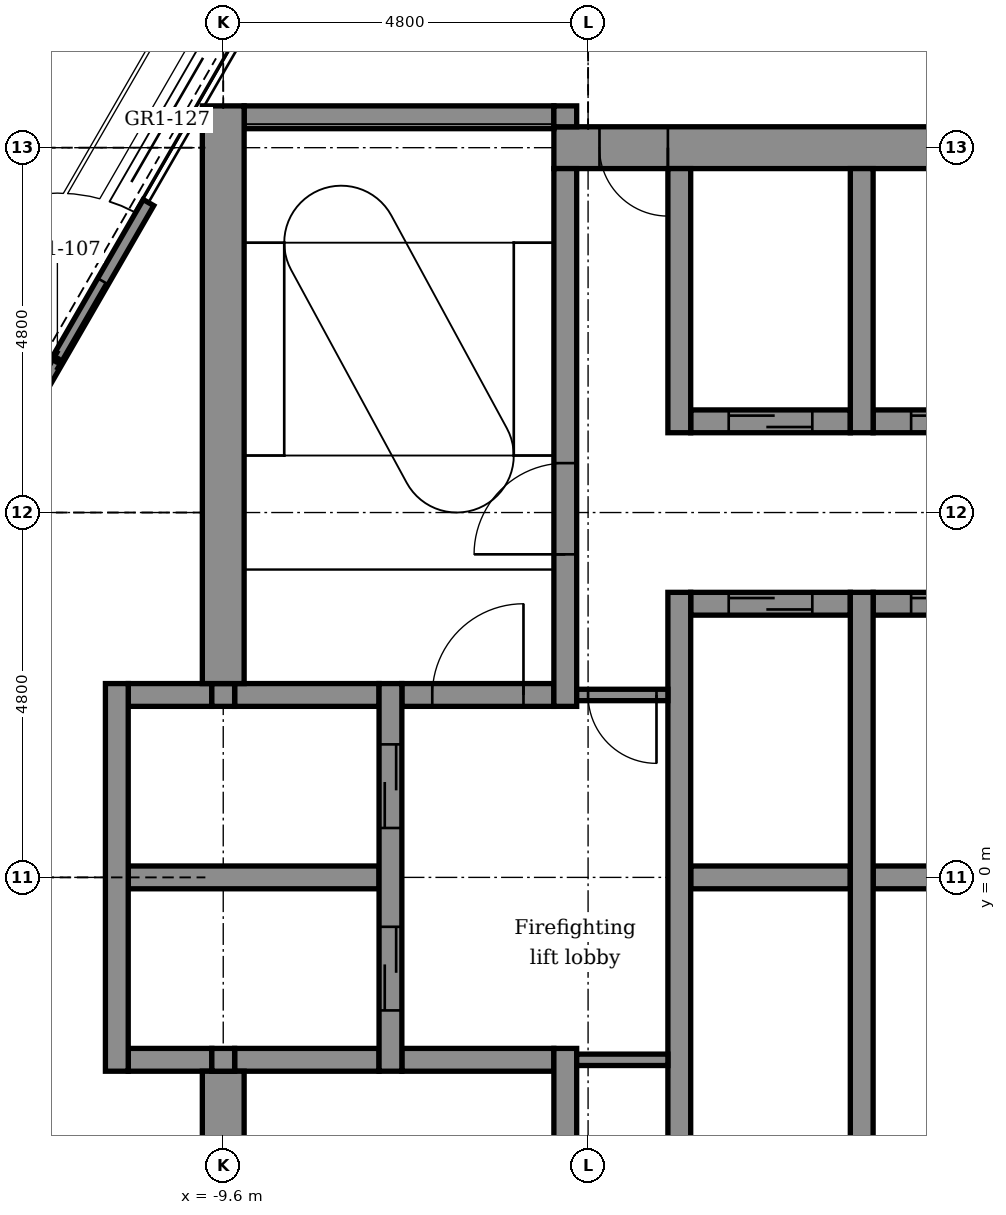
"""IFC4 building model, lengths in metres.
Left out: names, types, materials, properties, quantities, classifications, styles, units other than length and angle.
Written with IfcOpenShell. Run it as: python <this file> out.ifc"""

import sys

from ifc_helpers import new_model, si_unit, direction, frame, frame_2d, origin, place, context, subcontext, project, spatial, rectangle, extrude, element, fill, save


model = new_model("IFC4")
c1 = context("Model", 3, precision=1e-05, world=origin(), true_north=direction((0.0, 1.0)))
c2 = subcontext(c1, "Body", "Model", "MODEL_VIEW")
j1 = project(units=[si_unit("LENGTHUNIT", "METRE"), si_unit("PLANEANGLEUNIT", "RADIAN")], contexts=[c1])
p1 = place(None, origin())
s1 = spatial("IfcSite", under=j1, at=p1, CompositionType="ELEMENT")
p2 = place(p1, origin())
s2 = spatial("IfcBuilding", under=s1, at=p2, CompositionType="ELEMENT")
p3 = place(p2, frame((0.0, 0.0, 254.0)))
s3 = spatial("IfcBuildingStorey", under=s2, at=p3, CompositionType="ELEMENT", Elevation=254.0)
p4 = place(p3, frame((-10.85, -2.4, -0.15), z_axis=(0.0, 0.0, 1.0), x_axis=(1.0, 0.0, 0.0)))
e1 = element("IfcWall", 1, at=p4, inside=s3, PredefinedType="STANDARD", context=c2, shape_type="SweptSolid", body=[
    extrude(rectangle(XDim=1.1, YDim=0.3, at=frame_2d((0.55, 0.0))), origin(), (0.0, 0.0, 1.0), 3.9),
])
p5 = place(p3, frame((-9.45, -2.4, -0.15), z_axis=(0.0, 0.0, 1.0), x_axis=(1.0, 0.0, 0.0)))
e2 = element("IfcWall", 2, at=p5, inside=s3, PredefinedType="STANDARD", context=c2, shape_type="SweptSolid", body=[
    extrude(rectangle(XDim=1.9, YDim=0.3, at=frame_2d((0.95, 0.0))), origin(), (0.0, 0.0, 1.0), 3.9),
])
p6 = place(p3, frame((-7.25, -2.4, -0.15), z_axis=(0.0, 0.0, 1.0), x_axis=(1.0, 0.0, 0.0)))
e3 = element("IfcWall", 3, at=p6, inside=s3, PredefinedType="STANDARD", context=c2, shape_type="SweptSolid", body=[
    extrude(rectangle(XDim=2.0, YDim=0.3, at=frame_2d((1.0, 0.0))), origin(), (0.0, 0.0, 1.0), 3.9),
])
p7 = place(p3, frame((-10.85, 0.0, -0.15), z_axis=(0.0, 0.0, 1.0), x_axis=(1.0, 0.0, 0.0)))
e4 = element("IfcWall", 4, at=p7, inside=s3, PredefinedType="STANDARD", context=c2, shape_type="SweptSolid", body=[
    extrude(rectangle(XDim=3.3, YDim=0.3, at=frame_2d((1.65, 0.0))), origin(), (0.0, 0.0, 1.0), 3.9),
])
p8 = place(p3, frame((-3.45, 0.0, -0.15), z_axis=(0.0, 0.0, 1.0), x_axis=(1.0, 0.0, 0.0)))
e5 = element("IfcWall", 5, at=p8, inside=s3, PredefinedType="STANDARD", context=c2, shape_type="SweptSolid", body=[
    extrude(rectangle(XDim=2.1, YDim=0.3, at=frame_2d((1.05, 0.0))), origin(), (0.0, 0.0, 1.0), 3.9),
])
p9 = place(p3, frame((-1.05, 0.0, -0.15), z_axis=(0.0, 0.0, 1.0), x_axis=(1.0, 0.0, 0.0)))
e6 = element("IfcWall", 6, at=p9, inside=s3, PredefinedType="STANDARD", context=c2, shape_type="SweptSolid", body=[
    extrude(rectangle(XDim=2.1, YDim=0.3, at=frame_2d((1.05, 0.0))), origin(), (0.0, 0.0, 1.0), 3.9),
])
p10 = place(p3, frame((-10.85, 2.4, -0.15), z_axis=(0.0, 0.0, 1.0), x_axis=(1.0, 0.0, 0.0)))
e7 = element("IfcWall", 7, at=p10, inside=s3, PredefinedType="STANDARD", context=c2, shape_type="SweptSolid", body=[
    extrude(rectangle(XDim=1.1, YDim=0.3, at=frame_2d((0.55, 0.0))), origin(), (0.0, 0.0, 1.0), 3.9),
])
p11 = place(p3, frame((-9.45, 2.4, -0.15), z_axis=(0.0, 0.0, 1.0), x_axis=(1.0, 0.0, 0.0)))
e8 = element("IfcWall", 8, at=p11, inside=s3, PredefinedType="STANDARD", context=c2, shape_type="SweptSolid", body=[
    extrude(rectangle(XDim=1.9, YDim=0.3, at=frame_2d((0.95, 0.0))), origin(), (0.0, 0.0, 1.0), 3.9),
])
p12 = place(p3, frame((-7.25, 2.4, -0.15), z_axis=(0.0, 0.0, 1.0), x_axis=(1.0, 0.0, 0.0)))
e9 = element("IfcWall", 9, at=p12, inside=s3, PredefinedType="STANDARD", context=c2, shape_type="SweptSolid", body=[
    extrude(rectangle(XDim=2.0, YDim=0.3, at=frame_2d((1.0, 0.0))), origin(), (0.0, 0.0, 1.0), 3.9),
])
p13 = place(p12, frame((0.4, 0.0, 0.15)))
e10 = element("IfcOpeningElement", 10, at=p13, cuts=e9, PredefinedType="OPENING", context=c2, shape_type="SweptSolid", body=[
    extrude(rectangle(XDim=1.2, YDim=2.1, at=frame_2d((0.6, 1.05))), frame((0.0, 0.16, 0.0), z_axis=(0.0, -1.0, 0.0), x_axis=(1.0, 0.0, 0.0)), (0.0, 0.0, 1.0), 0.32),
])
p14 = place(p3, frame((-3.45, 3.6, -0.15), z_axis=(0.0, 0.0, 1.0), x_axis=(1.0, 0.0, 0.0)))
e11 = element("IfcWall", 11, at=p14, inside=s3, PredefinedType="STANDARD", context=c2, shape_type="SweptSolid", body=[
    extrude(rectangle(XDim=2.1, YDim=0.3, at=frame_2d((1.05, 0.0))), origin(), (0.0, 0.0, 1.0), 3.9),
])
p15 = place(p14, frame((0.5, 0.0, 0.15)))
e12 = element("IfcOpeningElement", 12, at=p15, cuts=e11, PredefinedType="OPENING", context=c2, shape_type="SweptSolid", body=[
    extrude(rectangle(XDim=1.1, YDim=2.1, at=frame_2d((0.55, 1.05))), frame((0.0, 0.16, 0.0), z_axis=(0.0, -1.0, 0.0), x_axis=(1.0, 0.0, 0.0)), (0.0, 0.0, 1.0), 0.32),
])
p16 = place(p3, frame((-1.05, 3.6, -0.15), z_axis=(0.0, 0.0, 1.0), x_axis=(1.0, 0.0, 0.0)))
e13 = element("IfcWall", 13, at=p16, inside=s3, PredefinedType="STANDARD", context=c2, shape_type="SweptSolid", body=[
    extrude(rectangle(XDim=2.1, YDim=0.3, at=frame_2d((1.05, 0.0))), origin(), (0.0, 0.0, 1.0), 3.9),
])
p17 = place(p16, frame((0.5, 0.0, 0.15)))
e14 = element("IfcOpeningElement", 14, at=p17, cuts=e13, PredefinedType="OPENING", context=c2, shape_type="SweptSolid", body=[
    extrude(rectangle(XDim=1.1, YDim=2.1, at=frame_2d((0.55, 1.05))), frame((0.0, 0.16, 0.0), z_axis=(0.0, -1.0, 0.0), x_axis=(1.0, 0.0, 0.0)), (0.0, 0.0, 1.0), 0.32),
])
p18 = place(p3, frame((-3.45, 6.0, -0.15), z_axis=(0.0, 0.0, 1.0), x_axis=(1.0, 0.0, 0.0)))
e15 = element("IfcWall", 15, at=p18, inside=s3, PredefinedType="STANDARD", context=c2, shape_type="SweptSolid", body=[
    extrude(rectangle(XDim=2.1, YDim=0.3, at=frame_2d((1.05, 0.0))), origin(), (0.0, 0.0, 1.0), 3.9),
])
p19 = place(p18, frame((0.5, 0.0, 0.15)))
e16 = element("IfcOpeningElement", 16, at=p19, cuts=e15, PredefinedType="OPENING", context=c2, shape_type="SweptSolid", body=[
    extrude(rectangle(XDim=1.1, YDim=2.1, at=frame_2d((0.55, 1.05))), frame((0.0, 0.16, 0.0), z_axis=(0.0, -1.0, 0.0), x_axis=(1.0, 0.0, 0.0)), (0.0, 0.0, 1.0), 0.32),
])
p20 = place(p3, frame((-1.05, 6.0, -0.15), z_axis=(0.0, 0.0, 1.0), x_axis=(1.0, 0.0, 0.0)))
e17 = element("IfcWall", 17, at=p20, inside=s3, PredefinedType="STANDARD", context=c2, shape_type="SweptSolid", body=[
    extrude(rectangle(XDim=2.1, YDim=0.3, at=frame_2d((1.05, 0.0))), origin(), (0.0, 0.0, 1.0), 3.9),
])
p21 = place(p20, frame((0.5, 0.0, 0.15)))
e18 = element("IfcOpeningElement", 18, at=p21, cuts=e17, PredefinedType="OPENING", context=c2, shape_type="SweptSolid", body=[
    extrude(rectangle(XDim=1.1, YDim=2.1, at=frame_2d((0.55, 1.05))), frame((0.0, 0.16, 0.0), z_axis=(0.0, -1.0, 0.0), x_axis=(1.0, 0.0, 0.0)), (0.0, 0.0, 1.0), 0.32),
])
p22 = place(p3, frame((-5.25, 9.6, -0.15), z_axis=(0.0, 0.0, 1.0), x_axis=(1.0, 0.0, 0.0)))
e19 = element("IfcWall", 19, at=p22, inside=s3, PredefinedType="SHEAR", context=c2, shape_type="SweptSolid", body=[
    extrude(rectangle(XDim=14.575, YDim=0.55, at=frame_2d((7.288, 0.0))), origin(), (0.0, 0.0, 1.0), 3.9),
])
p23 = place(p22, frame((0.6, 0.0, 0.15)))
e20 = element("IfcOpeningElement", 20, at=p23, cuts=e19, PredefinedType="OPENING", context=c2, shape_type="SweptSolid", body=[
    extrude(rectangle(XDim=0.9, YDim=2.1, at=frame_2d((0.45, 1.05))), frame((0.0, 0.285, 0.0), z_axis=(0.0, -1.0, 0.0), x_axis=(1.0, 0.0, 0.0)), (0.0, 0.0, 1.0), 0.57),
])
p24 = place(p3, frame((-9.325, 10.0, -0.15), z_axis=(0.0, 0.0, 1.0), x_axis=(1.0, 0.0, 0.0)))
e21 = element("IfcWall", 21, at=p24, inside=s3, PredefinedType="STANDARD", context=c2, shape_type="SweptSolid", body=[
    extrude(rectangle(XDim=4.075, YDim=0.3, at=frame_2d((2.038, 0.0))), origin(), (0.0, 0.0, 1.0), 3.9),
])
p25 = place(p3, frame((-11.0, -2.55, -0.15), z_axis=(0.0, 0.0, 1.0), x_axis=(0.0, 1.0, 0.0)))
e22 = element("IfcWall", 22, at=p25, inside=s3, PredefinedType="STANDARD", context=c2, shape_type="SweptSolid", body=[
    extrude(rectangle(XDim=5.1, YDim=0.3, at=frame_2d((2.55, 0.0))), origin(), (0.0, 0.0, 1.0), 3.9),
])
p26 = place(p3, frame((-9.6, -10.15, -0.15), z_axis=(0.0, 0.0, 1.0), x_axis=(0.0, 1.0, 0.0)))
e23 = element("IfcWall", 23, at=p26, inside=s3, PredefinedType="SHEAR", context=c2, shape_type="SweptSolid", body=[
    extrude(rectangle(XDim=7.6, YDim=0.55, at=frame_2d((3.8, 0.0))), origin(), (0.0, 0.0, 1.0), 3.9),
])
for number, where, z_axis, x_axis in (
    (24, (-9.6, -2.55, -0.15), (0.0, 0.0, 1.0), (0.0, 1.0, 0.0)),
    (25, (-9.6, 2.25, -0.15), (0.0, 0.0, 1.0), (0.0, 1.0, 0.0)),
):
    element("IfcWall", number, at=place(p3, frame(where, z_axis=z_axis, x_axis=x_axis)), inside=s3, PredefinedType="STANDARD", context=c2, shape_type="SweptSolid", body=[
        extrude(rectangle(XDim=0.3, YDim=0.3, at=frame_2d((0.15, 0.0))), origin(), (0.0, 0.0, 1.0), 3.9),
    ])
p27 = place(p3, frame((-9.6, 2.55, -0.15), z_axis=(0.0, 0.0, 1.0), x_axis=(0.0, 1.0, 0.0)))
e26 = element("IfcWall", 26, at=p27, inside=s3, PredefinedType="SHEAR", context=c2, shape_type="SweptSolid", body=[
    extrude(rectangle(XDim=7.6, YDim=0.55, at=frame_2d((3.8, 0.0))), origin(), (0.0, 0.0, 1.0), 3.9),
])
p28 = place(p3, frame((-7.4, -2.55, -0.15), z_axis=(0.0, 0.0, 1.0), x_axis=(0.0, 1.0, 0.0)))
e27 = element("IfcWall", 27, at=p28, inside=s3, PredefinedType="STANDARD", context=c2, shape_type="SweptSolid", body=[
    extrude(rectangle(XDim=5.1, YDim=0.3, at=frame_2d((2.55, 0.0))), origin(), (0.0, 0.0, 1.0), 3.9),
])
p29 = place(p28, frame((0.8, 0.0, 0.15)))
e28 = element("IfcOpeningElement", 28, at=p29, cuts=e27, PredefinedType="OPENING", context=c2, shape_type="SweptSolid", body=[
    extrude(rectangle(XDim=1.1, YDim=2.1, at=frame_2d((0.55, 1.05))), frame((0.0, 0.16, 0.0), z_axis=(0.0, -1.0, 0.0), x_axis=(1.0, 0.0, 0.0)), (0.0, 0.0, 1.0), 0.32),
])
p30 = place(p28, frame((3.2, 0.0, 0.15)))
e29 = element("IfcOpeningElement", 29, at=p30, cuts=e27, PredefinedType="OPENING", context=c2, shape_type="SweptSolid", body=[
    extrude(rectangle(XDim=1.1, YDim=2.1, at=frame_2d((0.55, 1.05))), frame((0.0, 0.16, 0.0), z_axis=(0.0, -1.0, 0.0), x_axis=(1.0, 0.0, 0.0)), (0.0, 0.0, 1.0), 0.32),
])
p31 = place(p3, frame((-5.1, -9.325, -0.15), z_axis=(0.0, 0.0, 1.0), x_axis=(0.0, 1.0, 0.0)))
e30 = element("IfcWall", 30, at=p31, inside=s3, PredefinedType="STANDARD", context=c2, shape_type="SweptSolid", body=[
    extrude(rectangle(XDim=7.075, YDim=0.3, at=frame_2d((3.538, 0.0))), origin(), (0.0, 0.0, 1.0), 3.9),
])
p32 = place(p31, frame((3.875, 0.0, 0.15)))
e31 = element("IfcOpeningElement", 31, at=p32, cuts=e30, PredefinedType="OPENING", context=c2, shape_type="SweptSolid", body=[
    extrude(rectangle(XDim=1.2, YDim=2.1, at=frame_2d((0.6, 1.05))), frame((0.0, 0.16, 0.0), z_axis=(0.0, -1.0, 0.0), x_axis=(1.0, 0.0, 0.0)), (0.0, 0.0, 1.0), 0.32),
])
p33 = place(p3, frame((-5.1, 2.25, -0.15), z_axis=(0.0, 0.0, 1.0), x_axis=(0.0, 1.0, 0.0)))
e32 = element("IfcWall", 32, at=p33, inside=s3, PredefinedType="STANDARD", context=c2, shape_type="SweptSolid", body=[
    extrude(rectangle(XDim=7.075, YDim=0.3, at=frame_2d((3.538, 0.0))), origin(), (0.0, 0.0, 1.0), 3.9),
])
p34 = place(p33, frame((2.0, 0.0, 0.15)))
e33 = element("IfcOpeningElement", 33, at=p34, cuts=e32, PredefinedType="OPENING", context=c2, shape_type="SweptSolid", body=[
    extrude(rectangle(XDim=1.2, YDim=2.1, at=frame_2d((0.6, 1.05))), frame((0.0, 0.16, 0.0), z_axis=(0.0, -1.0, 0.0), x_axis=(1.0, 0.0, 0.0)), (0.0, 0.0, 1.0), 0.32),
])
p35 = place(p3, frame((-5.1, 9.875, -0.15), z_axis=(0.0, 0.0, 1.0), x_axis=(0.0, 1.0, 0.0)))
e34 = element("IfcWall", 34, at=p35, inside=s3, PredefinedType="STANDARD", context=c2, shape_type="SweptSolid", body=[
    extrude(rectangle(XDim=0.275, YDim=0.3, at=frame_2d((0.137, 0.0))), origin(), (0.0, 0.0, 1.0), 3.9),
])
p36 = place(p3, frame((-3.6, -3.75, -0.15), z_axis=(0.0, 0.0, 1.0), x_axis=(0.0, 1.0, 0.0)))
e35 = element("IfcWall", 35, at=p36, inside=s3, PredefinedType="STANDARD", context=c2, shape_type="SweptSolid", body=[
    extrude(rectangle(XDim=7.5, YDim=0.3, at=frame_2d((3.75, 0.0))), origin(), (0.0, 0.0, 1.0), 3.9),
])
p37 = place(p3, frame((-3.6, 5.85, -0.15), z_axis=(0.0, 0.0, 1.0), x_axis=(0.0, 1.0, 0.0)))
e36 = element("IfcWall", 36, at=p37, inside=s3, PredefinedType="STANDARD", context=c2, shape_type="SweptSolid", body=[
    extrude(rectangle(XDim=3.475, YDim=0.3, at=frame_2d((1.737, 0.0))), origin(), (0.0, 0.0, 1.0), 3.9),
])
p38 = place(p3, frame((-1.2, -3.75, -0.15), z_axis=(0.0, 0.0, 1.0), x_axis=(0.0, 1.0, 0.0)))
e37 = element("IfcWall", 37, at=p38, inside=s3, PredefinedType="STANDARD", context=c2, shape_type="SweptSolid", body=[
    extrude(rectangle(XDim=7.5, YDim=0.3, at=frame_2d((3.75, 0.0))), origin(), (0.0, 0.0, 1.0), 3.9),
])
p39 = place(p3, frame((-1.2, 5.85, -0.15), z_axis=(0.0, 0.0, 1.0), x_axis=(0.0, 1.0, 0.0)))
e38 = element("IfcWall", 38, at=p39, inside=s3, PredefinedType="STANDARD", context=c2, shape_type="SweptSolid", body=[
    extrude(rectangle(XDim=3.475, YDim=0.3, at=frame_2d((1.737, 0.0))), origin(), (0.0, 0.0, 1.0), 3.9),
])
p40 = place(p3, frame((-12.98, 4.727, 0.0), z_axis=(0.0, 0.0, 1.0), x_axis=(0.500011970786, 0.866018492338, 0.0)))
e39 = element("IfcWall", 39, at=p40, inside=s3, PredefinedType="PARTITIONING", context=c2, shape_type="SweptSolid", body=[
    extrude(rectangle(XDim=4.793, YDim=0.16, at=frame_2d((2.397, 0.0))), origin(), (0.0, 0.0, 1.0), 3.75),
])
p41 = place(p40, frame((1.197, 0.0, 0.0)))
e40 = element("IfcOpeningElement", 40, at=p41, cuts=e39, PredefinedType="OPENING", context=c2, shape_type="SweptSolid", body=[
    extrude(rectangle(XDim=2.4, YDim=2.4, at=frame_2d((1.2, 1.2))), frame((0.0, 0.09, 0.0), z_axis=(0.0, -1.0, 0.0), x_axis=(1.0, 0.0, 0.0)), (0.0, 0.0, 1.0), 0.18),
])
p42 = place(p3, frame((-4.95, 2.4, 0.0), z_axis=(0.0, 0.0, 1.0), x_axis=(1.0, 0.0, 0.0)))
e41 = element("IfcWall", 41, at=p42, inside=s3, PredefinedType="PARTITIONING", context=c2, shape_type="SweptSolid", body=[
    extrude(rectangle(XDim=1.2, YDim=0.15, at=frame_2d((0.6, 0.0))), origin(), (0.0, 0.0, 1.0), 3.75),
])
p43 = place(p42, frame((0.15, 0.0, 0.0)))
e42 = element("IfcOpeningElement", 42, at=p43, cuts=e41, PredefinedType="OPENING", context=c2, shape_type="SweptSolid", body=[
    extrude(rectangle(XDim=0.9, YDim=2.1, at=frame_2d((0.45, 1.05))), frame((0.0, 0.085, 0.0), z_axis=(0.0, -1.0, 0.0), x_axis=(1.0, 0.0, 0.0)), (0.0, 0.0, 1.0), 0.17),
])
p44 = place(p3, frame((-4.95, -2.4, 0.0), z_axis=(0.0, 0.0, 1.0), x_axis=(1.0, 0.0, 0.0)))
e43 = element("IfcWall", 43, at=p44, inside=s3, PredefinedType="PARTITIONING", context=c2, shape_type="SweptSolid", body=[
    extrude(rectangle(XDim=1.2, YDim=0.15, at=frame_2d((0.6, 0.0))), origin(), (0.0, 0.0, 1.0), 3.75),
])
p45 = place(p41, origin())
e44 = element("IfcDoor", 44, at=p45, inside=s3, OperationType="DOUBLE_DOOR_SLIDING", PredefinedType="DOOR", context=c2, shape_type="SweptSolid", body=[
    extrude(rectangle(XDim=2.4, YDim=2.4, at=frame_2d((1.2, 1.2))), frame((0.0, 0.025, 0.0), z_axis=(0.0, -1.0, 0.0), x_axis=(1.0, 0.0, 0.0)), (0.0, 0.0, 1.0), 0.05),
])
fill(e40, e44)
p46 = place(p29, origin())
e45 = element("IfcDoor", 45, at=p46, inside=s3, OperationType="DOUBLE_DOOR_SLIDING", PredefinedType="DOOR", context=c2, shape_type="SweptSolid", body=[
    extrude(rectangle(XDim=1.1, YDim=2.1, at=frame_2d((0.55, 1.05))), frame((0.0, 0.025, 0.0), z_axis=(0.0, -1.0, 0.0), x_axis=(1.0, 0.0, 0.0)), (0.0, 0.0, 1.0), 0.05),
])
fill(e28, e45)
p47 = place(p30, origin())
e46 = element("IfcDoor", 46, at=p47, inside=s3, OperationType="DOUBLE_DOOR_SLIDING", PredefinedType="DOOR", context=c2, shape_type="SweptSolid", body=[
    extrude(rectangle(XDim=1.1, YDim=2.1, at=frame_2d((0.55, 1.05))), frame((0.0, 0.025, 0.0), z_axis=(0.0, -1.0, 0.0), x_axis=(1.0, 0.0, 0.0)), (0.0, 0.0, 1.0), 0.05),
])
fill(e29, e46)
p48 = place(p19, origin())
e47 = element("IfcDoor", 47, at=p48, inside=s3, OperationType="DOUBLE_DOOR_SLIDING", PredefinedType="DOOR", context=c2, shape_type="SweptSolid", body=[
    extrude(rectangle(XDim=1.1, YDim=2.1, at=frame_2d((0.55, 1.05))), frame((0.0, 0.025, 0.0), z_axis=(0.0, -1.0, 0.0), x_axis=(1.0, 0.0, 0.0)), (0.0, 0.0, 1.0), 0.05),
])
fill(e16, e47)
p49 = place(p21, origin())
e48 = element("IfcDoor", 48, at=p49, inside=s3, OperationType="DOUBLE_DOOR_SLIDING", PredefinedType="DOOR", context=c2, shape_type="SweptSolid", body=[
    extrude(rectangle(XDim=1.1, YDim=2.1, at=frame_2d((0.55, 1.05))), frame((0.0, 0.025, 0.0), z_axis=(0.0, -1.0, 0.0), x_axis=(1.0, 0.0, 0.0)), (0.0, 0.0, 1.0), 0.05),
])
fill(e18, e48)
p50 = place(p15, origin())
e49 = element("IfcDoor", 49, at=p50, inside=s3, OperationType="DOUBLE_DOOR_SLIDING", PredefinedType="DOOR", context=c2, shape_type="SweptSolid", body=[
    extrude(rectangle(XDim=1.1, YDim=2.1, at=frame_2d((0.55, 1.05))), frame((0.0, 0.025, 0.0), z_axis=(0.0, -1.0, 0.0), x_axis=(1.0, 0.0, 0.0)), (0.0, 0.0, 1.0), 0.05),
])
fill(e12, e49)
p51 = place(p17, origin())
e50 = element("IfcDoor", 50, at=p51, inside=s3, OperationType="DOUBLE_DOOR_SLIDING", PredefinedType="DOOR", context=c2, shape_type="SweptSolid", body=[
    extrude(rectangle(XDim=1.1, YDim=2.1, at=frame_2d((0.55, 1.05))), frame((0.0, 0.025, 0.0), z_axis=(0.0, -1.0, 0.0), x_axis=(1.0, 0.0, 0.0)), (0.0, 0.0, 1.0), 0.05),
])
fill(e14, e50)
p52 = place(p34, origin())
e51 = element("IfcDoor", 51, at=p52, inside=s3, OperationType="SINGLE_SWING_LEFT", PredefinedType="DOOR", context=c2, shape_type="SweptSolid", body=[
    extrude(rectangle(XDim=1.2, YDim=2.1, at=frame_2d((0.6, 1.05))), frame((0.0, 0.025, 0.0), z_axis=(0.0, -1.0, 0.0), x_axis=(1.0, 0.0, 0.0)), (0.0, 0.0, 1.0), 0.05),
])
fill(e33, e51)
p53 = place(p23, frame((0.9, 0.0, 0.0), z_axis=(0.0, 0.0, 1.0), x_axis=(-1.0, 0.0, 0.0)))
e52 = element("IfcDoor", 52, at=p53, inside=s3, OperationType="SINGLE_SWING_RIGHT", PredefinedType="DOOR", context=c2, shape_type="SweptSolid", body=[
    extrude(rectangle(XDim=0.9, YDim=2.1, at=frame_2d((0.45, 1.05))), frame((0.0, 0.025, 0.0), z_axis=(0.0, -1.0, 0.0), x_axis=(1.0, 0.0, 0.0)), (0.0, 0.0, 1.0), 0.05),
])
fill(e20, e52)
p54 = place(p43, frame((0.9, 0.0, 0.0), z_axis=(0.0, 0.0, 1.0), x_axis=(-1.0, 0.0, 0.0)))
e53 = element("IfcDoor", 53, at=p54, inside=s3, OperationType="SINGLE_SWING_RIGHT", PredefinedType="DOOR", context=c2, shape_type="SweptSolid", body=[
    extrude(rectangle(XDim=0.9, YDim=2.1, at=frame_2d((0.45, 1.05))), frame((0.0, 0.025, 0.0), z_axis=(0.0, -1.0, 0.0), x_axis=(1.0, 0.0, 0.0)), (0.0, 0.0, 1.0), 0.05),
])
fill(e42, e53)
p55 = place(p13, origin())
e54 = element("IfcDoor", 54, at=p55, inside=s3, OperationType="SINGLE_SWING_RIGHT", PredefinedType="DOOR", context=c2, shape_type="SweptSolid", body=[
    extrude(rectangle(XDim=1.2, YDim=2.1, at=frame_2d((0.6, 1.05))), frame((0.0, 0.025, 0.0), z_axis=(0.0, -1.0, 0.0), x_axis=(1.0, 0.0, 0.0)), (0.0, 0.0, 1.0), 0.05),
])
fill(e10, e54)
save(model, sys.argv[1])
